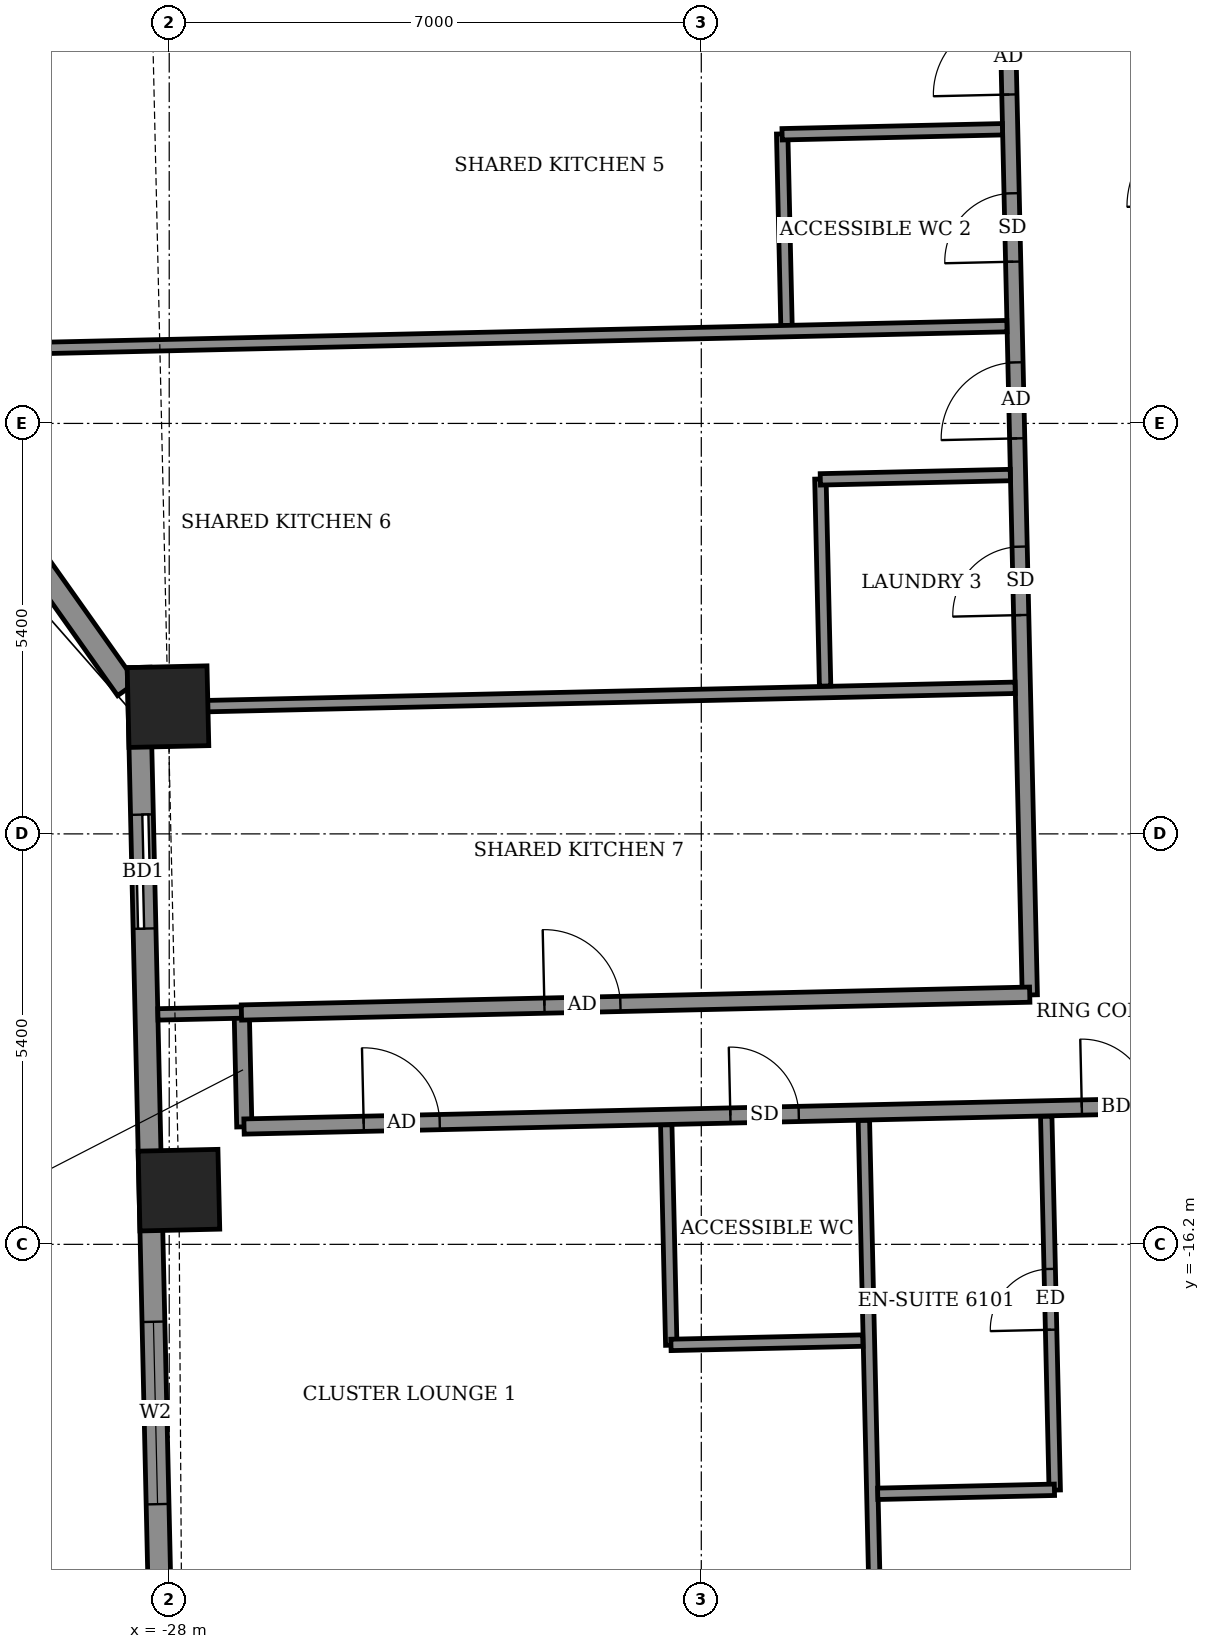
"""IFC4 building model, lengths in metres.
Left out: names, types, materials, properties, quantities, classifications, styles, units other than length and angle.
Written with IfcOpenShell. Run it as: python <this file> out.ifc"""

import sys

from ifc_helpers import new_model, si_unit, direction, frame, frame_2d, origin, origin_2d, place, context, subcontext, project, spatial, rectangle, extrude, element, fill, save


model = new_model("IFC4")
c1 = context("Model", 3, precision=1e-05, world=origin(), true_north=direction((0.0, 1.0)))
c2 = subcontext(c1, "Body", "Model", "MODEL_VIEW")
j1 = project(units=[si_unit("LENGTHUNIT", "METRE"), si_unit("PLANEANGLEUNIT", "RADIAN")], contexts=[c1])
p1 = place(None, origin())
s1 = spatial("IfcSite", under=j1, at=p1, CompositionType="ELEMENT")
p2 = place(p1, origin())
s2 = spatial("IfcBuilding", under=s1, at=p2, CompositionType="ELEMENT")
p3 = place(p2, frame((0.0, 0.0, 241.9)))
s3 = spatial("IfcBuildingStorey", under=s2, at=p3, CompositionType="ELEMENT", Elevation=241.9)
for number, where, z_axis, x_axis in (
    (1, (-28.016, -9.126, -0.55), (0.0, 0.0, 1.0), (0.023, -1.0, 0.0)),
    (2, (-27.872, -15.487, -0.55), (0.0, 0.0, 1.0), (0.023, -1.0, 0.0)),
):
    element("IfcColumn", number, at=place(p3, frame(where, z_axis=z_axis, x_axis=x_axis)), inside=s3, PredefinedType="COLUMN", context=c2, shape_type="SweptSolid", body=[
        extrude(rectangle(XDim=1.05, YDim=1.05, at=origin_2d()), origin(), (0.0, 0.0, 1.0), 3.6),
    ])
p4 = place(p3, frame((-30.62, -5.982, 0.0), z_axis=(0.0, 0.0, 1.0), x_axis=(0.578108441206, -0.815959943996, 0.0)))
e3 = element("IfcWall", 3, at=p4, inside=s3, PredefinedType="SOLIDWALL", context=c2, shape_type="SweptSolid", body=[
    extrude(rectangle(XDim=3.569, YDim=0.3, at=frame_2d((1.784, 0.0))), origin(), (0.0, 0.0, 1.0), 3.05),
])
p5 = place(p4, frame((0.338, 0.0, 0.9)))
e4 = element("IfcOpeningElement", 4, at=p5, cuts=e3, PredefinedType="OPENING", context=c2, shape_type="SweptSolid", body=[
    extrude(rectangle(XDim=1.2, YDim=1.5, at=frame_2d((0.6, 0.75))), frame((0.0, 0.16, 0.0), z_axis=(0.0, -1.0, 0.0), x_axis=(1.0, 0.0, 0.0)), (0.0, 0.0, 1.0), 0.32),
])
p6 = place(p3, frame((-28.403, -8.61, 0.0), z_axis=(0.0, 0.0, 1.0), x_axis=(0.022680342038, -0.999742767958, 0.0)))
e5 = element("IfcWall", 5, at=p6, inside=s3, PredefinedType="SOLIDWALL", context=c2, shape_type="SweptSolid", body=[
    extrude(rectangle(XDim=13.1, YDim=0.3, at=frame_2d((6.55, 0.0))), origin(), (0.0, 0.0, 1.0), 2.55),
])
p7 = place(p6, frame((1.937, 0.0, 0.0)))
e6 = element("IfcOpeningElement", 6, at=p7, cuts=e5, PredefinedType="OPENING", context=c2, shape_type="SweptSolid", body=[
    extrude(rectangle(XDim=1.5, YDim=2.4, at=frame_2d((0.75, 1.2))), frame((0.0, 0.16, 0.0), z_axis=(0.0, -1.0, 0.0), x_axis=(1.0, 0.0, 0.0)), (0.0, 0.0, 1.0), 0.32),
])
p8 = place(p6, frame((8.611, 0.0, 0.9)))
e7 = element("IfcOpeningElement", 7, at=p8, cuts=e5, PredefinedType="OPENING", context=c2, shape_type="SweptSolid", body=[
    extrude(rectangle(XDim=2.4, YDim=1.5, at=frame_2d((1.2, 0.75))), frame((0.0, 0.16, 0.0), z_axis=(0.0, -1.0, 0.0), x_axis=(1.0, 0.0, 0.0)), (0.0, 0.0, 1.0), 0.32),
])
p9 = place(p3, frame((-18.603, -25.942, 0.0), z_axis=(0.0, 0.0, 1.0), x_axis=(-0.022684842063, 0.99974266586, 0.0)))
e8 = element("IfcWall", 8, at=p9, inside=s3, PredefinedType="PARTITIONING", context=c2, shape_type="SweptSolid", body=[
    extrude(rectangle(XDim=11.376, YDim=0.15, at=frame_2d((5.688, 0.0))), origin(), (0.0, 0.0, 1.0), 2.55),
])
p10 = place(p3, frame((-16.35, -19.433, 0.0), z_axis=(0.0, 0.0, 1.0), x_axis=(-0.022724786614, 0.999741758692, 0.0)))
e9 = element("IfcWall", 9, at=p10, inside=s3, PredefinedType="PARTITIONING", context=c2, shape_type="SweptSolid", body=[
    extrude(rectangle(XDim=4.92, YDim=0.15, at=frame_2d((2.46, 0.0))), origin(), (0.0, 0.0, 1.0), 3.05),
])
p11 = place(p10, frame((2.11, 0.0, 0.0)))
e10 = element("IfcOpeningElement", 10, at=p11, cuts=e9, PredefinedType="OPENING", context=c2, shape_type="SweptSolid", body=[
    extrude(rectangle(XDim=0.8, YDim=2.1, at=frame_2d((0.4, 1.05))), frame((0.0, 0.085, 0.0), z_axis=(0.0, -1.0, 0.0), x_axis=(1.0, 0.0, 0.0)), (0.0, 0.0, 1.0), 0.17),
])
p12 = place(p3, frame((-18.679, -19.482, 0.0), z_axis=(0.0, 0.0, 1.0), x_axis=(0.999740478815, 0.022781023197, 0.0)))
e11 = element("IfcWall", 11, at=p12, inside=s3, PredefinedType="PARTITIONING", context=c2, shape_type="SweptSolid", body=[
    extrude(rectangle(XDim=2.325, YDim=0.15, at=frame_2d((1.163, 0.0))), origin(), (0.0, 0.0, 1.0), 3.05),
])
p13 = place(p3, frame((-21.395, -17.527, 0.0), z_axis=(0.0, 0.0, 1.0), x_axis=(-0.022730967319, 0.999741618182, 0.0)))
e12 = element("IfcWall", 12, at=p13, inside=s3, PredefinedType="PARTITIONING", context=c2, shape_type="SweptSolid", body=[
    extrude(rectangle(XDim=2.9, YDim=0.15, at=frame_2d((1.45, 0.0))), origin(), (0.0, 0.0, 1.0), 3.05),
])
p14 = place(p3, frame((-21.399, -17.523, 0.0), z_axis=(0.0, 0.0, 1.0), x_axis=(0.9997461113, 0.022532486354, 0.0)))
e13 = element("IfcWall", 13, at=p14, inside=s3, PredefinedType="PARTITIONING", context=c2, shape_type="SweptSolid", body=[
    extrude(rectangle(XDim=2.525, YDim=0.15, at=frame_2d((1.262, 0.0))), origin(), (0.0, 0.0, 1.0), 3.05),
])
p15 = place(p3, frame((-27.012, -14.654, 0.0), z_axis=(0.0, 0.0, 1.0), x_axis=(-0.022617910375, 0.999744182344, 0.0)))
e14 = element("IfcWall", 14, at=p15, inside=s3, PredefinedType="PARTITIONING", context=c2, shape_type="SweptSolid", body=[
    extrude(rectangle(XDim=1.5, YDim=0.2, at=frame_2d((0.75, 0.0))), origin(), (0.0, 0.0, 1.0), 3.05),
])
p16 = place(p3, frame((-27.016, -14.65, 0.0), z_axis=(0.0, 0.0, 1.0), x_axis=(0.999742874861, 0.022675629315, 0.0)))
e15 = element("IfcWall", 15, at=p16, inside=s3, PredefinedType="PARTITIONING", context=c2, shape_type="SweptSolid", body=[
    extrude(rectangle(XDim=50.883, YDim=0.2, at=frame_2d((25.442, 0.0))), origin(), (0.0, 0.0, 1.0), 3.05),
])
p17 = place(p16, frame((1.575, 0.0, 0.0)))
e16 = element("IfcOpeningElement", 16, at=p17, cuts=e15, PredefinedType="OPENING", context=c2, shape_type="SweptSolid", body=[
    extrude(rectangle(XDim=1.0, YDim=2.1, at=frame_2d((0.5, 1.05))), frame((0.0, 0.11, 0.0), z_axis=(0.0, -1.0, 0.0), x_axis=(1.0, 0.0, 0.0)), (0.0, 0.0, 1.0), 0.22),
])
p18 = place(p16, frame((6.4, 0.0, 0.0)))
e17 = element("IfcOpeningElement", 17, at=p18, cuts=e15, PredefinedType="OPENING", context=c2, shape_type="SweptSolid", body=[
    extrude(rectangle(XDim=0.9, YDim=2.1, at=frame_2d((0.45, 1.05))), frame((0.0, 0.11, 0.0), z_axis=(0.0, -1.0, 0.0), x_axis=(1.0, 0.0, 0.0)), (0.0, 0.0, 1.0), 0.22),
])
p19 = place(p16, frame((11.025, 0.0, 0.0)))
e18 = element("IfcOpeningElement", 18, at=p19, cuts=e15, PredefinedType="OPENING", context=c2, shape_type="SweptSolid", body=[
    extrude(rectangle(XDim=0.9, YDim=2.1, at=frame_2d((0.45, 1.05))), frame((0.0, 0.11, 0.0), z_axis=(0.0, -1.0, 0.0), x_axis=(1.0, 0.0, 0.0)), (0.0, 0.0, 1.0), 0.22),
])
p20 = place(p16, frame((12.925, 0.0, 0.0)))
e19 = element("IfcOpeningElement", 19, at=p20, cuts=e15, PredefinedType="OPENING", context=c2, shape_type="SweptSolid", body=[
    extrude(rectangle(XDim=0.9, YDim=2.1, at=frame_2d((0.45, 1.05))), frame((0.0, 0.11, 0.0), z_axis=(0.0, -1.0, 0.0), x_axis=(1.0, 0.0, 0.0)), (0.0, 0.0, 1.0), 0.22),
])
p21 = place(p16, frame((19.65, 0.0, 0.0)))
e20 = element("IfcOpeningElement", 20, at=p21, cuts=e15, PredefinedType="OPENING", context=c2, shape_type="SweptSolid", body=[
    extrude(rectangle(XDim=0.9, YDim=2.1, at=frame_2d((0.45, 1.05))), frame((0.0, 0.11, 0.0), z_axis=(0.0, -1.0, 0.0), x_axis=(1.0, 0.0, 0.0)), (0.0, 0.0, 1.0), 0.22),
])
p22 = place(p16, frame((21.575, 0.0, 0.0)))
e21 = element("IfcOpeningElement", 21, at=p22, cuts=e15, PredefinedType="OPENING", context=c2, shape_type="SweptSolid", body=[
    extrude(rectangle(XDim=0.9, YDim=2.1, at=frame_2d((0.45, 1.05))), frame((0.0, 0.11, 0.0), z_axis=(0.0, -1.0, 0.0), x_axis=(1.0, 0.0, 0.0)), (0.0, 0.0, 1.0), 0.22),
])
p23 = place(p16, frame((28.25, 0.0, 0.0)))
e22 = element("IfcOpeningElement", 22, at=p23, cuts=e15, PredefinedType="OPENING", context=c2, shape_type="SweptSolid", body=[
    extrude(rectangle(XDim=0.9, YDim=2.1, at=frame_2d((0.45, 1.05))), frame((0.0, 0.11, 0.0), z_axis=(0.0, -1.0, 0.0), x_axis=(1.0, 0.0, 0.0)), (0.0, 0.0, 1.0), 0.22),
])
p24 = place(p16, frame((30.125, 0.0, 0.0)))
e23 = element("IfcOpeningElement", 23, at=p24, cuts=e15, PredefinedType="OPENING", context=c2, shape_type="SweptSolid", body=[
    extrude(rectangle(XDim=0.9, YDim=2.1, at=frame_2d((0.45, 1.05))), frame((0.0, 0.11, 0.0), z_axis=(0.0, -1.0, 0.0), x_axis=(1.0, 0.0, 0.0)), (0.0, 0.0, 1.0), 0.22),
])
p25 = place(p16, frame((36.9, 0.0, 0.0)))
e24 = element("IfcOpeningElement", 24, at=p25, cuts=e15, PredefinedType="OPENING", context=c2, shape_type="SweptSolid", body=[
    extrude(rectangle(XDim=0.9, YDim=2.1, at=frame_2d((0.45, 1.05))), frame((0.0, 0.11, 0.0), z_axis=(0.0, -1.0, 0.0), x_axis=(1.0, 0.0, 0.0)), (0.0, 0.0, 1.0), 0.22),
])
p26 = place(p16, frame((38.85, 0.0, 0.0)))
e25 = element("IfcOpeningElement", 25, at=p26, cuts=e15, PredefinedType="OPENING", context=c2, shape_type="SweptSolid", body=[
    extrude(rectangle(XDim=0.9, YDim=2.1, at=frame_2d((0.45, 1.05))), frame((0.0, 0.11, 0.0), z_axis=(0.0, -1.0, 0.0), x_axis=(1.0, 0.0, 0.0)), (0.0, 0.0, 1.0), 0.22),
])
p27 = place(p16, frame((48.629, 0.0, 0.0)))
e26 = element("IfcOpeningElement", 26, at=p27, cuts=e15, PredefinedType="OPENING", context=c2, shape_type="SweptSolid", body=[
    extrude(rectangle(XDim=1.0, YDim=2.1, at=frame_2d((0.5, 1.05))), frame((0.0, 0.11, 0.0), z_axis=(0.0, -1.0, 0.0), x_axis=(1.0, 0.0, 0.0)), (0.0, 0.0, 1.0), 0.22),
])
p28 = place(p16, frame((43.6, 0.0, 0.0)))
e27 = element("IfcOpeningElement", 27, at=p28, cuts=e15, PredefinedType="OPENING", context=c2, shape_type="SweptSolid", body=[
    extrude(rectangle(XDim=0.9, YDim=2.1, at=frame_2d((0.45, 1.05))), frame((0.0, 0.11, 0.0), z_axis=(0.0, -1.0, 0.0), x_axis=(1.0, 0.0, 0.0)), (0.0, 0.0, 1.0), 0.22),
])
p29 = place(p3, frame((-16.678, -12.919, 0.0), z_axis=(0.0, 0.0, 1.0), x_axis=(-0.022696191528, 0.999742408268, 0.0)))
e28 = element("IfcWall", 28, at=p29, inside=s3, PredefinedType="PARTITIONING", context=c2, shape_type="SweptSolid", body=[
    extrude(rectangle(XDim=25.074, YDim=0.2, at=frame_2d((12.537, 0.0))), origin(), (0.0, 0.0, 1.0), 3.05),
])
p30 = place(p29, frame((19.537, 0.0, 0.0)))
e29 = element("IfcOpeningElement", 29, at=p30, cuts=e28, PredefinedType="OPENING", context=c2, shape_type="SweptSolid", body=[
    extrude(rectangle(XDim=1.0, YDim=2.1, at=frame_2d((0.5, 1.05))), frame((0.0, 0.11, 0.0), z_axis=(0.0, -1.0, 0.0), x_axis=(1.0, 0.0, 0.0)), (0.0, 0.0, 1.0), 0.22),
])
p31 = place(p29, frame((23.224, 0.0, 0.0)))
e30 = element("IfcOpeningElement", 30, at=p31, cuts=e28, PredefinedType="OPENING", context=c2, shape_type="SweptSolid", body=[
    extrude(rectangle(XDim=0.9, YDim=2.1, at=frame_2d((0.45, 1.05))), frame((0.0, 0.11, 0.0), z_axis=(0.0, -1.0, 0.0), x_axis=(1.0, 0.0, 0.0)), (0.0, 0.0, 1.0), 0.22),
])
p32 = place(p29, frame((13.849, 0.0, 0.0)))
e31 = element("IfcOpeningElement", 31, at=p32, cuts=e28, PredefinedType="OPENING", context=c2, shape_type="SweptSolid", body=[
    extrude(rectangle(XDim=1.0, YDim=2.1, at=frame_2d((0.5, 1.05))), frame((0.0, 0.11, 0.0), z_axis=(0.0, -1.0, 0.0), x_axis=(1.0, 0.0, 0.0)), (0.0, 0.0, 1.0), 0.22),
])
p33 = place(p29, frame((16.149, 0.0, 0.0)))
e32 = element("IfcOpeningElement", 32, at=p33, cuts=e28, PredefinedType="OPENING", context=c2, shape_type="SweptSolid", body=[
    extrude(rectangle(XDim=0.9, YDim=2.1, at=frame_2d((0.45, 1.05))), frame((0.0, 0.11, 0.0), z_axis=(0.0, -1.0, 0.0), x_axis=(1.0, 0.0, 0.0)), (0.0, 0.0, 1.0), 0.22),
])
p34 = place(p29, frame((11.849, 0.0, 0.0)))
e33 = element("IfcOpeningElement", 33, at=p34, cuts=e28, PredefinedType="OPENING", context=c2, shape_type="SweptSolid", body=[
    extrude(rectangle(XDim=1.0, YDim=2.1, at=frame_2d((0.5, 1.05))), frame((0.0, 0.11, 0.0), z_axis=(0.0, -1.0, 0.0), x_axis=(1.0, 0.0, 0.0)), (0.0, 0.0, 1.0), 0.22),
])
p35 = place(p29, frame((9.649, 0.0, 0.0)))
e34 = element("IfcOpeningElement", 34, at=p35, cuts=e28, PredefinedType="OPENING", context=c2, shape_type="SweptSolid", body=[
    extrude(rectangle(XDim=0.9, YDim=2.1, at=frame_2d((0.45, 1.05))), frame((0.0, 0.11, 0.0), z_axis=(0.0, -1.0, 0.0), x_axis=(1.0, 0.0, 0.0)), (0.0, 0.0, 1.0), 0.22),
])
p36 = place(p29, frame((7.324, 0.0, 0.0)))
e35 = element("IfcOpeningElement", 35, at=p36, cuts=e28, PredefinedType="OPENING", context=c2, shape_type="SweptSolid", body=[
    extrude(rectangle(XDim=1.0, YDim=2.1, at=frame_2d((0.5, 1.05))), frame((0.0, 0.11, 0.0), z_axis=(0.0, -1.0, 0.0), x_axis=(1.0, 0.0, 0.0)), (0.0, 0.0, 1.0), 0.22),
])
p37 = place(p29, frame((4.999, 0.0, 0.0)))
e36 = element("IfcOpeningElement", 36, at=p37, cuts=e28, PredefinedType="OPENING", context=c2, shape_type="SweptSolid", body=[
    extrude(rectangle(XDim=0.9, YDim=2.1, at=frame_2d((0.45, 1.05))), frame((0.0, 0.11, 0.0), z_axis=(0.0, -1.0, 0.0), x_axis=(1.0, 0.0, 0.0)), (0.0, 0.0, 1.0), 0.22),
])
p38 = place(p3, frame((-28.149, -13.175, 0.0), z_axis=(0.0, 0.0, 1.0), x_axis=(0.999740233734, 0.022791776024, 0.0)))
e37 = element("IfcWall", 37, at=p38, inside=s3, PredefinedType="PARTITIONING", context=c2, shape_type="SweptSolid", body=[
    extrude(rectangle(XDim=1.103, YDim=0.15, at=frame_2d((0.552, 0.0))), origin(), (0.0, 0.0, 1.0), 2.55),
])
p39 = place(p3, frame((-27.05, -13.15, 0.0), z_axis=(0.0, 0.0, 1.0), x_axis=(0.999743679035, 0.022640146404, 0.0)))
e38 = element("IfcWall", 38, at=p39, inside=s3, PredefinedType="PARTITIONING", context=c2, shape_type="SweptSolid", body=[
    extrude(rectangle(XDim=10.374, YDim=0.2, at=frame_2d((5.187, 0.0))), origin(), (0.0, 0.0, 1.0), 3.05),
])
p40 = place(p39, frame((3.987, 0.0, 0.0)))
e39 = element("IfcOpeningElement", 39, at=p40, cuts=e38, PredefinedType="OPENING", context=c2, shape_type="SweptSolid", body=[
    extrude(rectangle(XDim=1.0, YDim=2.1, at=frame_2d((0.5, 1.05))), frame((0.0, 0.11, 0.0), z_axis=(0.0, -1.0, 0.0), x_axis=(1.0, 0.0, 0.0)), (0.0, 0.0, 1.0), 0.22),
])
p41 = place(p3, frame((-28.241, -9.136, 0.0), z_axis=(0.0, 0.0, 1.0), x_axis=(0.999742533279, 0.022690684282, 0.0)))
e40 = element("IfcWall", 40, at=p41, inside=s3, PredefinedType="PARTITIONING", context=c2, shape_type="SweptSolid", body=[
    extrude(rectangle(XDim=11.373, YDim=0.15, at=frame_2d((5.687, 0.0))), origin(), (0.0, 0.0, 1.0), 3.05),
])
p42 = place(p3, frame((-19.371, -8.855, 0.0), z_axis=(0.0, 0.0, 1.0), x_axis=(-0.022760079124, 0.999740955847, 0.0)))
e41 = element("IfcWall", 41, at=p42, inside=s3, PredefinedType="PARTITIONING", context=c2, shape_type="SweptSolid", body=[
    extrude(rectangle(XDim=2.725, YDim=0.15, at=frame_2d((1.362, 0.0))), origin(), (0.0, 0.0, 1.0), 3.05),
])
p43 = place(p3, frame((-19.434, -6.136, 0.0), z_axis=(0.0, 0.0, 1.0), x_axis=(0.999741230352, 0.02274801823, 0.0)))
e42 = element("IfcWall", 42, at=p43, inside=s3, PredefinedType="PARTITIONING", context=c2, shape_type="SweptSolid", body=[
    extrude(rectangle(XDim=2.501, YDim=0.15, at=frame_2d((1.25, 0.0))), origin(), (0.0, 0.0, 1.0), 3.05),
])
p44 = place(p3, frame((-19.879, -4.115, 0.0), z_axis=(0.0, 0.0, 1.0), x_axis=(-0.022629142889, 0.99974392816, 0.0)))
e43 = element("IfcWall", 43, at=p44, inside=s3, PredefinedType="PARTITIONING", context=c2, shape_type="SweptSolid", body=[
    extrude(rectangle(XDim=2.525, YDim=0.15, at=frame_2d((1.262, 0.0))), origin(), (0.0, 0.0, 1.0), 3.05),
])
p45 = place(p3, frame((-31.289, -4.444, 0.0), z_axis=(0.0, 0.0, 1.0), x_axis=(0.99974382177, 0.022633842623, 0.0)))
e44 = element("IfcWall", 44, at=p45, inside=s3, PredefinedType="PARTITIONING", context=c2, shape_type="SweptSolid", body=[
    extrude(rectangle(XDim=14.314, YDim=0.15, at=frame_2d((7.157, 0.0))), origin(), (0.0, 0.0, 1.0), 2.1),
])
p46 = place(p3, frame((-19.937, -1.596, 0.0), z_axis=(0.0, 0.0, 1.0), x_axis=(0.999741574676, 0.022732880677, 0.0)))
e45 = element("IfcWall", 45, at=p46, inside=s3, PredefinedType="PARTITIONING", context=c2, shape_type="SweptSolid", body=[
    extrude(rectangle(XDim=2.9, YDim=0.15, at=frame_2d((1.45, 0.0))), origin(), (0.0, 0.0, 1.0), 3.05),
])
p47 = place(p7, origin())
e46 = element("IfcDoor", 46, at=p47, inside=s3, OperationType="SLIDING_TO_LEFT", PredefinedType="DOOR", context=c2, shape_type="SweptSolid", body=[
    extrude(rectangle(XDim=1.5, YDim=2.4, at=frame_2d((0.75, 1.2))), frame((0.0, 0.025, 0.0), z_axis=(0.0, -1.0, 0.0), x_axis=(1.0, 0.0, 0.0)), (0.0, 0.0, 1.0), 0.05),
])
fill(e6, e46)
p48 = place(p8, origin())
e47 = element("IfcWindow", 47, at=p48, inside=s3, PartitioningType="DOUBLE_PANEL_VERTICAL", PredefinedType="WINDOW", context=c2, shape_type="SweptSolid", body=[
    extrude(rectangle(XDim=2.4, YDim=1.5, at=frame_2d((1.2, 0.75))), frame((0.0, 0.03, 0.0), z_axis=(0.0, -1.0, 0.0), x_axis=(1.0, 0.0, 0.0)), (0.0, 0.0, 1.0), 0.06),
])
fill(e7, e47)
p49 = place(p17, origin())
e48 = element("IfcDoor", 48, at=p49, inside=s3, OperationType="SINGLE_SWING_LEFT", PredefinedType="DOOR", context=c2, shape_type="SweptSolid", body=[
    extrude(rectangle(XDim=1.0, YDim=2.1, at=frame_2d((0.5, 1.05))), frame((0.0, 0.025, 0.0), z_axis=(0.0, -1.0, 0.0), x_axis=(1.0, 0.0, 0.0)), (0.0, 0.0, 1.0), 0.05),
])
fill(e16, e48)
p50 = place(p18, origin())
e49 = element("IfcDoor", 49, at=p50, inside=s3, OperationType="SINGLE_SWING_LEFT", PredefinedType="DOOR", context=c2, shape_type="SweptSolid", body=[
    extrude(rectangle(XDim=0.9, YDim=2.1, at=frame_2d((0.45, 1.05))), frame((0.0, 0.025, 0.0), z_axis=(0.0, -1.0, 0.0), x_axis=(1.0, 0.0, 0.0)), (0.0, 0.0, 1.0), 0.05),
])
fill(e17, e49)
p51 = place(p19, origin())
e50 = element("IfcDoor", 50, at=p51, inside=s3, OperationType="SINGLE_SWING_LEFT", PredefinedType="DOOR", context=c2, shape_type="SweptSolid", body=[
    extrude(rectangle(XDim=0.9, YDim=2.1, at=frame_2d((0.45, 1.05))), frame((0.0, 0.025, 0.0), z_axis=(0.0, -1.0, 0.0), x_axis=(1.0, 0.0, 0.0)), (0.0, 0.0, 1.0), 0.05),
])
fill(e18, e50)
p52 = place(p11, origin())
e51 = element("IfcDoor", 51, at=p52, inside=s3, OperationType="SINGLE_SWING_LEFT", PredefinedType="DOOR", context=c2, shape_type="SweptSolid", body=[
    extrude(rectangle(XDim=0.8, YDim=2.1, at=frame_2d((0.4, 1.05))), frame((0.0, 0.025, 0.0), z_axis=(0.0, -1.0, 0.0), x_axis=(1.0, 0.0, 0.0)), (0.0, 0.0, 1.0), 0.05),
])
fill(e10, e51)
p53 = place(p34, origin())
e52 = element("IfcDoor", 52, at=p53, inside=s3, OperationType="SINGLE_SWING_LEFT", PredefinedType="DOOR", context=c2, shape_type="SweptSolid", body=[
    extrude(rectangle(XDim=1.0, YDim=2.1, at=frame_2d((0.5, 1.05))), frame((0.0, 0.025, 0.0), z_axis=(0.0, -1.0, 0.0), x_axis=(1.0, 0.0, 0.0)), (0.0, 0.0, 1.0), 0.05),
])
fill(e33, e52)
p54 = place(p35, origin())
e53 = element("IfcDoor", 53, at=p54, inside=s3, OperationType="SINGLE_SWING_LEFT", PredefinedType="DOOR", context=c2, shape_type="SweptSolid", body=[
    extrude(rectangle(XDim=0.9, YDim=2.1, at=frame_2d((0.45, 1.05))), frame((0.0, 0.025, 0.0), z_axis=(0.0, -1.0, 0.0), x_axis=(1.0, 0.0, 0.0)), (0.0, 0.0, 1.0), 0.05),
])
fill(e34, e53)
p55 = place(p36, origin())
e54 = element("IfcDoor", 54, at=p55, inside=s3, OperationType="SINGLE_SWING_RIGHT", PredefinedType="DOOR", context=c2, shape_type="SweptSolid", body=[
    extrude(rectangle(XDim=1.0, YDim=2.1, at=frame_2d((0.5, 1.05))), frame((0.0, 0.025, 0.0), z_axis=(0.0, -1.0, 0.0), x_axis=(1.0, 0.0, 0.0)), (0.0, 0.0, 1.0), 0.05),
])
fill(e35, e54)
p56 = place(p37, origin())
e55 = element("IfcDoor", 55, at=p56, inside=s3, OperationType="SINGLE_SWING_RIGHT", PredefinedType="DOOR", context=c2, shape_type="SweptSolid", body=[
    extrude(rectangle(XDim=0.9, YDim=2.1, at=frame_2d((0.45, 1.05))), frame((0.0, 0.025, 0.0), z_axis=(0.0, -1.0, 0.0), x_axis=(1.0, 0.0, 0.0)), (0.0, 0.0, 1.0), 0.05),
])
fill(e36, e55)
p57 = place(p40, origin())
e56 = element("IfcDoor", 56, at=p57, inside=s3, OperationType="SINGLE_SWING_LEFT", PredefinedType="DOOR", context=c2, shape_type="SweptSolid", body=[
    extrude(rectangle(XDim=1.0, YDim=2.1, at=frame_2d((0.5, 1.05))), frame((0.0, 0.025, 0.0), z_axis=(0.0, -1.0, 0.0), x_axis=(1.0, 0.0, 0.0)), (0.0, 0.0, 1.0), 0.05),
])
fill(e39, e56)
save(model, sys.argv[1])
